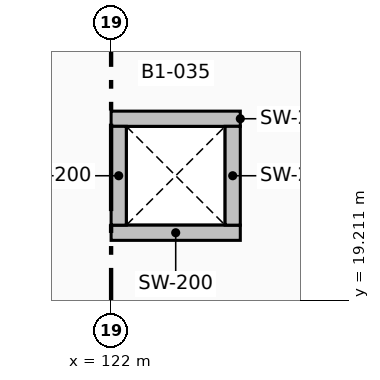
"""IFC4 building model, lengths in metres.
Left out: names, types, materials, properties, quantities, classifications, styles, units other than length and angle.
Written with IfcOpenShell. Run it as: python <this file> out.ifc"""

import sys

from ifc_helpers import new_model, si_unit, direction, frame, frame_2d, origin, place, context, subcontext, project, spatial, rectangle, extrude, element, save


model = new_model("IFC4")
c1 = context("Model", 3, precision=1e-05, world=origin(), true_north=direction((0.0, 1.0)))
c2 = subcontext(c1, "Body", "Model", "MODEL_VIEW")
j1 = project(units=[si_unit("LENGTHUNIT", "METRE"), si_unit("PLANEANGLEUNIT", "RADIAN")], contexts=[c1])
p1 = place(None, origin())
s1 = spatial("IfcSite", under=j1, at=p1, CompositionType="ELEMENT")
p2 = place(p1, origin())
s2 = spatial("IfcBuilding", under=s1, at=p2, CompositionType="ELEMENT")
p3 = place(p2, frame((0.0, 0.0, -4.8)))
s3 = spatial("IfcBuildingStorey", under=s2, at=p3, CompositionType="ELEMENT", Elevation=-4.8)
for number, where, z_axis, x_axis in (
    (1, (122.0, 20.1, 0.0), (0.0, 0.0, 1.0), (1.0, 0.0, 0.0)),
    (2, (123.7, 21.6, 0.0), (0.0, 0.0, 1.0), (-1.0, 0.0, 0.0)),
):
    element("IfcWall", number, at=place(p3, frame(where, z_axis=z_axis, x_axis=x_axis)), inside=s3, PredefinedType="PARTITIONING", context=c2, shape_type="SweptSolid", body=[
        extrude(rectangle(XDim=1.7, YDim=0.2, at=frame_2d((0.85, 0.0))), origin(), (0.0, 0.0, 1.0), 4.5),
    ])
p4 = place(p3, frame((122.1, 20.2, 0.0), z_axis=(0.0, 0.0, 1.0), x_axis=(0.0, 1.0, 0.0)))
e3 = element("IfcWall", 3, at=p4, inside=s3, PredefinedType="PARTITIONING", context=c2, shape_type="SweptSolid", body=[
    extrude(rectangle(XDim=1.3, YDim=0.2, at=frame_2d((0.65, 0.0))), origin(), (0.0, 0.0, 1.0), 3.742),
])
p5 = place(p3, frame((123.6, 21.5, 0.0), z_axis=(0.0, 0.0, 1.0), x_axis=(0.0, -1.0, 0.0)))
e4 = element("IfcWall", 4, at=p5, inside=s3, PredefinedType="PARTITIONING", context=c2, shape_type="SweptSolid", body=[
    extrude(rectangle(XDim=1.3, YDim=0.2, at=frame_2d((0.65, 0.0))), origin(), (0.0, 0.0, 1.0), 4.5),
])
save(model, sys.argv[1])
